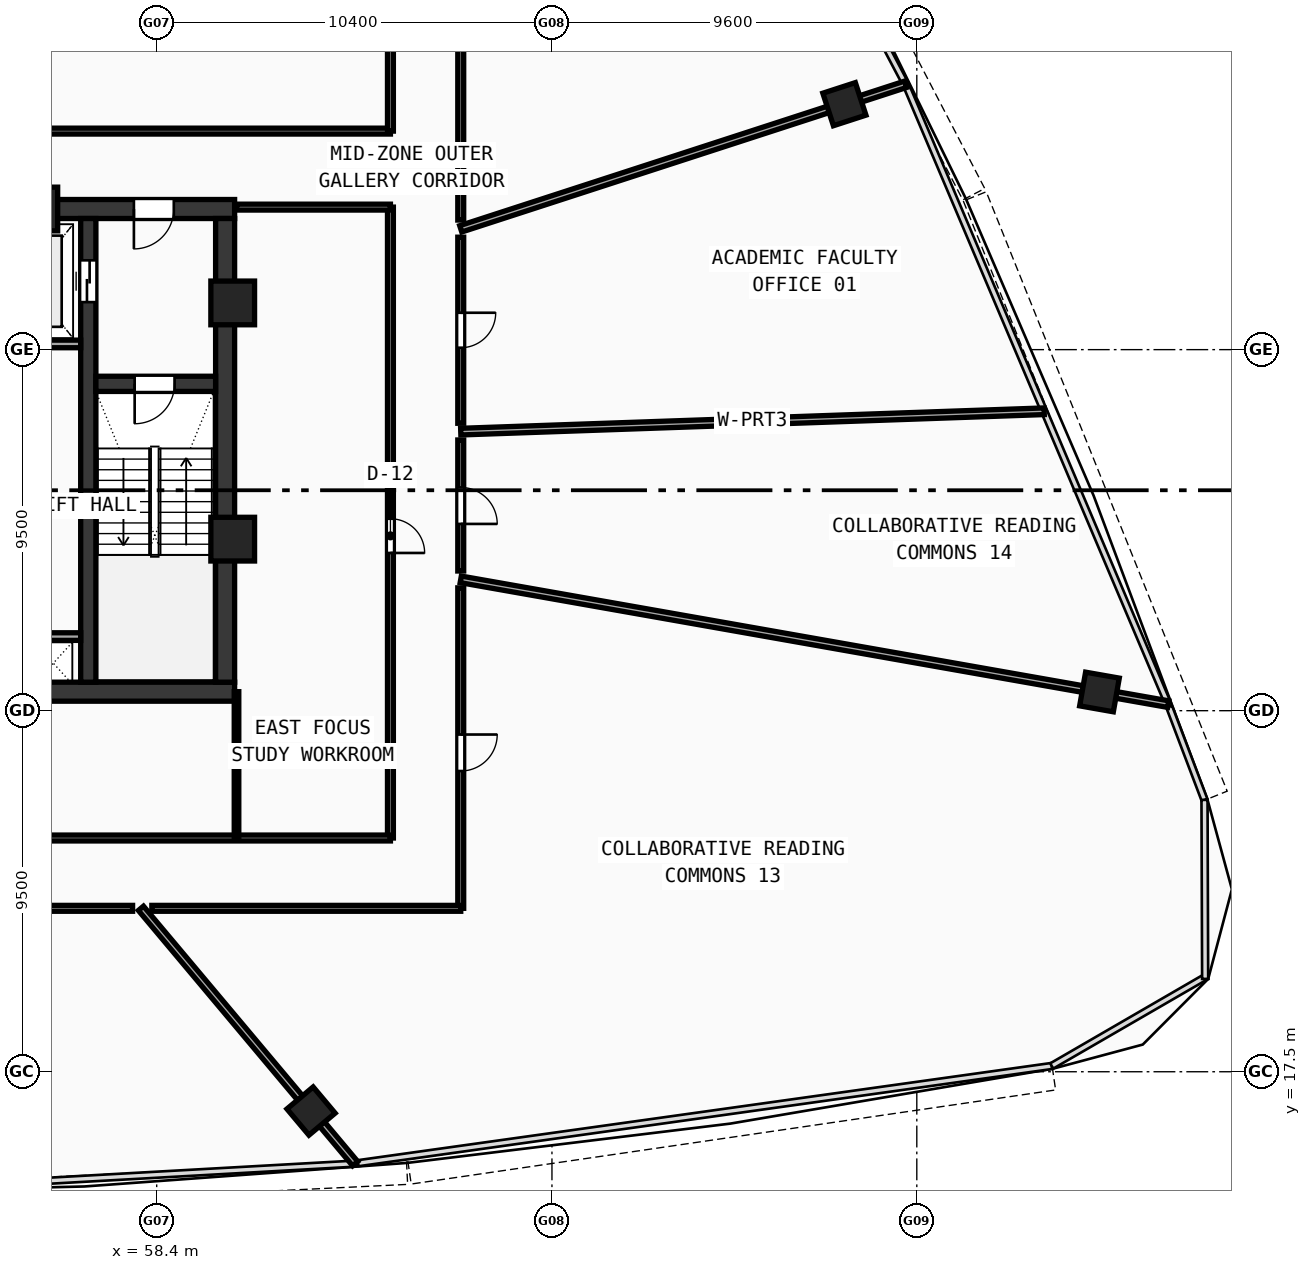
"""IFC4 building model, lengths in metres.
Left out: names, types, materials, properties, quantities, classifications, styles, units other than length and angle.
Written with IfcOpenShell. Run it as: python <this file> out.ifc"""

import sys

from ifc_helpers import new_model, si_unit, direction, frame, frame_2d, origin, origin_with_axes, origin_2d, place, context, subcontext, project, spatial, rectangle, hollow_rectangle, extrude, source, transform, mapped, element, fill, save


model = new_model("IFC4")
c1 = context("Model", 3, precision=1e-05, world=origin(), true_north=direction((0.0, 1.0)))
c2 = subcontext(c1, "Body", "Model", "MODEL_VIEW")
j1 = project(units=[si_unit("LENGTHUNIT", "METRE"), si_unit("PLANEANGLEUNIT", "RADIAN")], contexts=[c1])
p1 = place(None, origin())
s1 = spatial("IfcSite", under=j1, at=p1, CompositionType="ELEMENT")
p2 = place(p1, origin())
s2 = spatial("IfcBuilding", under=s1, at=p2, CompositionType="ELEMENT")
p3 = place(p2, frame((0.0, 0.0, 207.56)))
s3 = spatial("IfcBuildingStorey", under=s2, at=p3, CompositionType="ELEMENT", Elevation=207.56)
p4 = place(p3, frame((35.55, 27.5, 0.0), z_axis=(0.0, 0.0, 1.0), x_axis=(1.0, 0.0, 0.0)))
e1 = element("IfcWall", 1, at=p4, inside=s3, PredefinedType="SHEAR", context=c2, shape_type="SweptSolid", body=[
    extrude(rectangle(XDim=24.9, YDim=0.5, at=frame_2d((12.45, 0.0))), origin(), (0.0, 0.0, 1.0), 3.54),
])
p5 = place(p3, frame((49.2, 40.2, 0.0), z_axis=(0.0, 0.0, 1.0), x_axis=(1.0, 0.0, 0.0)))
e2 = element("IfcWall", 2, at=p5, inside=s3, PredefinedType="SHEAR", context=c2, shape_type="SweptSolid", body=[
    extrude(rectangle(XDim=11.25, YDim=0.5, at=frame_2d((5.625, 0.0))), origin(), (0.0, 0.0, 1.0), 3.54),
])
p6 = place(p5, frame((8.6, 0.0, 0.0)))
e3 = element("IfcOpeningElement", 3, at=p6, cuts=e2, PredefinedType="OPENING", context=c2, shape_type="SweptSolid", body=[
    extrude(rectangle(XDim=1.05, YDim=2.1, at=frame_2d((0.525, 1.05))), frame((0.0, 0.26, 0.0), z_axis=(0.0, -1.0, 0.0), x_axis=(1.0, 0.0, 0.0)), (0.0, 0.0, 1.0), 0.52),
])
p7 = place(p3, frame((60.2, 27.75, 0.0), z_axis=(0.0, 0.0, 1.0), x_axis=(0.0, 1.0, 0.0)))
e4 = element("IfcWall", 4, at=p7, inside=s3, PredefinedType="SHEAR", context=c2, shape_type="SweptSolid", body=[
    extrude(rectangle(XDim=12.2, YDim=0.5, at=frame_2d((6.1, 0.0))), origin(), (0.0, 0.0, 1.0), 3.54),
])
p8 = place(p3, frame((56.6, 27.75, 0.0), z_axis=(0.0, 0.0, 1.0), x_axis=(0.0, 1.0, 0.0)))
e5 = element("IfcWall", 5, at=p8, inside=s3, PredefinedType="SHEAR", context=c2, shape_type="SweptSolid", body=[
    extrude(rectangle(XDim=12.2, YDim=0.4, at=frame_2d((6.1, 0.0))), origin(), (0.0, 0.0, 1.0), 3.54),
])
p9 = place(p8, frame((10.0, 0.0, 0.0)))
e6 = element("IfcOpeningElement", 6, at=p9, cuts=e5, PredefinedType="OPENING", context=c2, shape_type="SweptSolid", body=[
    extrude(rectangle(XDim=1.1, YDim=2.1, at=frame_2d((0.55, 1.05))), frame((0.0, 0.21, 0.0), z_axis=(0.0, -1.0, 0.0), x_axis=(1.0, 0.0, 0.0)), (0.0, 0.0, 1.0), 0.42),
])
p10 = place(p3, frame((56.8, 35.6, 0.0), z_axis=(0.0, 0.0, 1.0), x_axis=(1.0, 0.0, 0.0)))
e7 = element("IfcWall", 7, at=p10, inside=s3, PredefinedType="SHEAR", context=c2, shape_type="SweptSolid", body=[
    extrude(rectangle(XDim=3.15, YDim=0.4, at=frame_2d((1.575, 0.0))), origin(), (0.0, 0.0, 1.0), 3.54),
])
p11 = place(p10, frame((1.02, 0.0, 0.0)))
e8 = element("IfcOpeningElement", 8, at=p11, cuts=e7, PredefinedType="OPENING", context=c2, shape_type="SweptSolid", body=[
    extrude(rectangle(XDim=1.05, YDim=2.1, at=frame_2d((0.525, 1.05))), frame((0.0, 0.21, 0.0), z_axis=(0.0, -1.0, 0.0), x_axis=(1.0, 0.0, 0.0)), (0.0, 0.0, 1.0), 0.42),
])
m1 = source(origin(), c2, "Body", "SweptSolid", [
    extrude(hollow_rectangle(XDim=1.15, YDim=1.15, WallThickness=0.048, at=origin_2d()), origin(), (0.0, 0.0, 1.0), 3.8),
])
for number, where, z_axis, x_axis in (
    (9, (60.4, 31.513, -0.26), (0.0, 0.0, 1.0), (1.0, 0.0, 0.0)),
    (10, (60.4, 37.729, -0.26), (0.0, 0.0, 1.0), (1.0, 0.0, 0.0)),
    (11, (55.219, 40.2, -0.26), (0.0, 0.0, 1.0), (1.0, 0.0, 0.0)),
):
    element("IfcColumn", number, at=place(p3, frame(where, z_axis=z_axis, x_axis=x_axis)), inside=s3, PredefinedType="COLUMN", context=c2, shape_type="MappedRepresentation", body=[
        mapped(m1, transform((0.0, 0.0, 0.0), scale=1.0)),
    ])
m2 = source(origin(), c2, "Body", "SweptSolid", [
    extrude(hollow_rectangle(XDim=0.9, YDim=0.9, WallThickness=0.036, at=origin_2d()), origin(), (0.0, 0.0, 1.0), 3.8),
])
for number, where, z_axis, x_axis in (
    (12, (62.461, 16.466, -0.26), (0.0, 0.0, 1.0), (0.766, 0.643, 0.0)),
    (13, (83.207, 27.492, -0.26), (0.0, 0.0, 1.0), (0.174, 0.985, 0.0)),
    (14, (76.495, 42.958, -0.26), (0.0, 0.0, 1.0), (-0.309, 0.951, 0.0)),
):
    element("IfcColumn", number, at=place(p3, frame(where, z_axis=z_axis, x_axis=x_axis)), inside=s3, PredefinedType="COLUMN", context=c2, shape_type="MappedRepresentation", body=[
        mapped(m2, transform((0.0, 0.0, 0.0), scale=1.0)),
    ])
p12 = place(p3, frame((53.68, 36.65, 0.0), z_axis=(0.0, 0.0, 1.0), x_axis=(1.0, 0.0, 0.0)))
e15 = element("IfcWall", 15, at=p12, inside=s3, PredefinedType="SOLIDWALL", context=c2, shape_type="SweptSolid", body=[
    extrude(rectangle(XDim=2.72, YDim=0.2, at=frame_2d((1.36, 0.0))), origin(), (0.0, 0.0, 1.0), 3.54),
])
p13 = place(p3, frame((55.12, 28.95, 0.0), z_axis=(0.0, 0.0, 1.0), x_axis=(1.0, 0.0, 0.0)))
e16 = element("IfcWall", 16, at=p13, inside=s3, PredefinedType="SOLIDWALL", context=c2, shape_type="SweptSolid", body=[
    extrude(rectangle(XDim=1.28, YDim=0.2, at=frame_2d((0.64, 0.0))), origin(), (0.0, 0.0, 1.0), 3.54),
])
p14 = place(p3, frame((31.45, 42.25, 0.0), z_axis=(0.0, 0.0, 1.0), x_axis=(1.0, 0.0, 0.0)))
e17 = element("IfcWall", 17, at=p14, inside=s3, PredefinedType="PARTITIONING", context=c2, shape_type="SweptSolid", body=[
    extrude(rectangle(XDim=33.1, YDim=0.155, at=frame_2d((16.55, 0.0))), origin(), (0.0, 0.0, 1.0), 2.89),
])
p15 = place(p3, frame((64.55, 42.25, 0.0), z_axis=(0.0, 0.0, 1.0), x_axis=(0.0, 1.0, 0.0)))
e18 = element("IfcWall", 18, at=p15, inside=s3, PredefinedType="PARTITIONING", context=c2, shape_type="SweptSolid", body=[
    extrude(rectangle(XDim=11.7, YDim=0.155, at=frame_2d((5.85, 0.0))), origin(), (0.0, 0.0, 1.0), 2.89),
])
p16 = place(p3, frame((64.55, 23.65, 0.0), z_axis=(0.0, 0.0, 1.0), x_axis=(0.0, 1.0, 0.0)))
e19 = element("IfcWall", 19, at=p16, inside=s3, PredefinedType="PARTITIONING", context=c2, shape_type="SweptSolid", body=[
    extrude(rectangle(XDim=16.6, YDim=0.155, at=frame_2d((8.3, 0.0))), origin(), (0.0, 0.0, 1.0), 2.89),
])
p17 = place(p16, frame((7.5, 0.0, 0.0)))
e20 = element("IfcOpeningElement", 20, at=p17, cuts=e19, PredefinedType="OPENING", context=c2, shape_type="SweptSolid", body=[
    extrude(rectangle(XDim=0.9, YDim=2.08, at=frame_2d((0.45, 1.04))), frame((0.0, 0.087, 0.0), z_axis=(0.0, -1.0, 0.0), x_axis=(1.0, 0.0, 0.0)), (0.0, 0.0, 1.0), 0.175),
])
p18 = place(p3, frame((31.45, 23.65, 0.0), z_axis=(0.0, 0.0, 1.0), x_axis=(1.0, 0.0, 0.0)))
e21 = element("IfcWall", 21, at=p18, inside=s3, PredefinedType="PARTITIONING", context=c2, shape_type="SweptSolid", body=[
    extrude(rectangle(XDim=33.1, YDim=0.155, at=frame_2d((16.55, 0.0))), origin(), (0.0, 0.0, 1.0), 2.89),
])
p19 = place(p18, frame((16.0, 0.0, 0.0)))
e22 = element("IfcOpeningElement", 22, at=p19, cuts=e21, PredefinedType="OPENING", context=c2, shape_type="SweptSolid", body=[
    extrude(rectangle(XDim=0.92, YDim=2.1, at=frame_2d((0.46, 1.05))), frame((0.0, 0.087, 0.0), z_axis=(0.0, -1.0, 0.0), x_axis=(1.0, 0.0, 0.0)), (0.0, 0.0, 1.0), 0.175),
])
p20 = place(p3, frame((60.5, 40.25, 0.0), z_axis=(0.0, 0.0, 1.0), x_axis=(1.0, 0.0, 0.0)))
e23 = element("IfcWall", 23, at=p20, inside=s3, PredefinedType="PARTITIONING", context=c2, shape_type="SweptSolid", body=[
    extrude(rectangle(XDim=4.05, YDim=0.155, at=frame_2d((2.025, 0.0))), origin(), (0.0, 0.0, 1.0), 3.54),
])
p21 = place(p3, frame((60.5, 23.65, 0.0), z_axis=(0.0, 0.0, 1.0), x_axis=(0.0, 1.0, 0.0)))
e24 = element("IfcWall", 24, at=p21, inside=s3, PredefinedType="PARTITIONING", context=c2, shape_type="SweptSolid", body=[
    extrude(rectangle(XDim=3.85, YDim=0.12, at=frame_2d((1.925, 0.0))), origin(), (0.0, 0.0, 1.0), 3.14),
])
p22 = place(p3, frame((66.4, 34.343, 0.0), z_axis=(0.0, 0.0, 1.0), x_axis=(0.999390706755, 0.034902940442, 0.0)))
e25 = element("IfcWall", 25, at=p22, inside=s3, PredefinedType="PARTITIONING", context=c2, shape_type="SweptSolid", body=[
    extrude(rectangle(XDim=15.361, YDim=0.175, at=frame_2d((7.68, 0.0))), origin(), (0.0, 0.0, 1.0), 2.89),
])
p23 = place(p3, frame((66.4, 39.678, 0.0), z_axis=(0.0, 0.0, 1.0), x_axis=(0.951057676857, 0.309013422511, 0.0)))
e26 = element("IfcWall", 26, at=p23, inside=s3, PredefinedType="PARTITIONING", context=c2, shape_type="SweptSolid", body=[
    extrude(rectangle(XDim=12.31, YDim=0.175, at=frame_2d((6.155, 0.0))), origin(), (0.0, 0.0, 1.0), 2.89),
])
p24 = place(p3, frame((57.985, 21.8, 0.0), z_axis=(0.0, 0.0, 1.0), x_axis=(0.642774108653, -0.766055771629, 0.0)))
e27 = element("IfcWall", 27, at=p24, inside=s3, PredefinedType="PARTITIONING", context=c2, shape_type="SweptSolid", body=[
    extrude(rectangle(XDim=8.769, YDim=0.175, at=frame_2d((4.385, 0.0))), origin(), (0.0, 0.0, 1.0), 2.89),
])
p25 = place(p3, frame((66.4, 30.456, 0.0), z_axis=(0.0, 0.0, 1.0), x_axis=(0.984807864876, -0.173647543254, 0.0)))
e28 = element("IfcWall", 28, at=p25, inside=s3, PredefinedType="PARTITIONING", context=c2, shape_type="SweptSolid", body=[
    extrude(rectangle(XDim=18.902, YDim=0.175, at=frame_2d((9.451, 0.0))), origin(), (0.0, 0.0, 1.0), 2.89),
])
p26 = place(p3, frame((66.4, 55.8, 0.0), z_axis=(0.0, 0.0, 1.0), x_axis=(0.0, -1.0, 0.0)))
e29 = element("IfcWall", 29, at=p26, inside=s3, PredefinedType="PARTITIONING", context=c2, shape_type="SweptSolid", body=[
    extrude(rectangle(XDim=15.89, YDim=0.155, at=frame_2d((7.945, 0.0))), origin(), (0.0, 0.0, 1.0), 2.89),
])
p27 = place(p26, frame((7.356, 0.0, 0.0)))
e30 = element("IfcOpeningElement", 30, at=p27, cuts=e29, PredefinedType="OPENING", context=c2, shape_type="SweptSolid", body=[
    extrude(rectangle(XDim=0.96, YDim=2.12, at=frame_2d((0.48, 1.06))), frame((0.0, 0.087, 0.0), z_axis=(0.0, -1.0, 0.0), x_axis=(1.0, 0.0, 0.0)), (0.0, 0.0, 1.0), 0.175),
])
p28 = place(p3, frame((66.4, 39.459, 0.0), z_axis=(0.0, 0.0, 1.0), x_axis=(0.0, -1.0, 0.0)))
e31 = element("IfcWall", 31, at=p28, inside=s3, PredefinedType="PARTITIONING", context=c2, shape_type="SweptSolid", body=[
    extrude(rectangle(XDim=4.896, YDim=0.155, at=frame_2d((2.448, 0.0))), origin(), (0.0, 0.0, 1.0), 3.14),
])
p29 = place(p28, frame((1.988, 0.0, 0.0)))
e32 = element("IfcOpeningElement", 32, at=p29, cuts=e31, PredefinedType="OPENING", context=c2, shape_type="SweptSolid", body=[
    extrude(rectangle(XDim=0.92, YDim=2.1, at=frame_2d((0.46, 1.05))), frame((0.0, 0.087, 0.0), z_axis=(0.0, -1.0, 0.0), x_axis=(1.0, 0.0, 0.0)), (0.0, 0.0, 1.0), 0.175),
])
p30 = place(p3, frame((66.4, 34.123, 0.0), z_axis=(0.0, 0.0, 1.0), x_axis=(0.0, -1.0, 0.0)))
e33 = element("IfcWall", 33, at=p30, inside=s3, PredefinedType="PARTITIONING", context=c2, shape_type="SweptSolid", body=[
    extrude(rectangle(XDim=3.448, YDim=0.155, at=frame_2d((1.724, 0.0))), origin(), (0.0, 0.0, 1.0), 3.54),
])
p31 = place(p30, frame((1.249, 0.0, 0.0)))
e34 = element("IfcOpeningElement", 34, at=p31, cuts=e33, PredefinedType="OPENING", context=c2, shape_type="SweptSolid", body=[
    extrude(rectangle(XDim=0.96, YDim=2.12, at=frame_2d((0.48, 1.06))), frame((0.0, 0.087, 0.0), z_axis=(0.0, -1.0, 0.0), x_axis=(1.0, 0.0, 0.0)), (0.0, 0.0, 1.0), 0.175),
])
p32 = place(p3, frame((66.4, 30.232, 0.0), z_axis=(0.0, 0.0, 1.0), x_axis=(0.0, -1.0, 0.0)))
e35 = element("IfcWall", 35, at=p32, inside=s3, PredefinedType="PARTITIONING", context=c2, shape_type="SweptSolid", body=[
    extrude(rectangle(XDim=8.432, YDim=0.155, at=frame_2d((4.216, 0.0))), origin(), (0.0, 0.0, 1.0), 3.14),
])
p33 = place(p32, frame((3.859, 0.0, 0.0)))
e36 = element("IfcOpeningElement", 36, at=p33, cuts=e35, PredefinedType="OPENING", context=c2, shape_type="SweptSolid", body=[
    extrude(rectangle(XDim=0.96, YDim=2.12, at=frame_2d((0.48, 1.06))), frame((0.0, 0.087, 0.0), z_axis=(0.0, -1.0, 0.0), x_axis=(1.0, 0.0, 0.0)), (0.0, 0.0, 1.0), 0.175),
])
p34 = place(p3, frame((66.4, 21.8, 0.0), z_axis=(0.0, 0.0, 1.0), x_axis=(-1.0, 0.0, 0.0)))
e37 = element("IfcWall", 37, at=p34, inside=s3, PredefinedType="PARTITIONING", context=c2, shape_type="SweptSolid", body=[
    extrude(rectangle(XDim=8.127, YDim=0.155, at=frame_2d((4.064, 0.0))), origin(), (0.0, 0.0, 1.0), 3.14),
])
p35 = place(p3, frame((57.765, 21.8, 0.0), z_axis=(0.0, 0.0, 1.0), x_axis=(-1.0, 0.0, 0.0)))
e38 = element("IfcWall", 38, at=p35, inside=s3, PredefinedType="PARTITIONING", context=c2, shape_type="SweptSolid", body=[
    extrude(rectangle(XDim=12.734, YDim=0.155, at=frame_2d((6.367, 0.0))), origin(), (0.0, 0.0, 1.0), 2.89),
])
p36 = place(p35, frame((5.892, 0.0, 0.0)))
e39 = element("IfcOpeningElement", 39, at=p36, cuts=e38, PredefinedType="OPENING", context=c2, shape_type="SweptSolid", body=[
    extrude(rectangle(XDim=0.96, YDim=2.12, at=frame_2d((0.48, 1.06))), frame((0.0, 0.087, 0.0), z_axis=(0.0, -1.0, 0.0), x_axis=(1.0, 0.0, 0.0)), (0.0, 0.0, 1.0), 0.175),
])
m3 = source(origin(), c2, "Body", "SweptSolid", [
    extrude(rectangle(XDim=1.05, YDim=2.1, at=frame_2d((0.525, 1.05))), frame((0.0, 0.025, 0.0), z_axis=(0.0, -1.0, 0.0), x_axis=(1.0, 0.0, 0.0)), (0.0, 0.0, 1.0), 0.05),
])
p37 = place(p11, frame((1.05, 0.0, 0.0), z_axis=(0.0, 0.0, 1.0), x_axis=(-1.0, 0.0, 0.0)))
e40 = element("IfcDoor", 40, at=p37, inside=s3, OperationType="SINGLE_SWING_RIGHT", PredefinedType="DOOR", context=c2, shape_type="MappedRepresentation", body=[
    mapped(m3, transform((0.0, 0.0, 0.0), scale=1.0)),
])
fill(e8, e40)
p38 = place(p6, frame((1.05, 0.0, 0.0), z_axis=(0.0, 0.0, 1.0), x_axis=(-1.0, 0.0, 0.0)))
e41 = element("IfcDoor", 41, at=p38, inside=s3, OperationType="SINGLE_SWING_RIGHT", PredefinedType="DOOR", context=c2, shape_type="MappedRepresentation", body=[
    mapped(m3, transform((0.0, 0.0, 0.0), scale=1.0)),
])
fill(e3, e41)
m4 = source(origin(), c2, "Body", "SweptSolid", [
    extrude(rectangle(XDim=1.1, YDim=2.1, at=frame_2d((0.55, 1.05))), frame((0.0, 0.025, 0.0), z_axis=(0.0, -1.0, 0.0), x_axis=(1.0, 0.0, 0.0)), (0.0, 0.0, 1.0), 0.05),
])
p39 = place(p9, origin_with_axes())
e42 = element("IfcDoor", 42, at=p39, inside=s3, OperationType="DOUBLE_DOOR_SLIDING", PredefinedType="DOOR", context=c2, shape_type="MappedRepresentation", body=[
    mapped(m4, transform((0.0, 0.0, 0.0), scale=1.0)),
])
fill(e6, e42)
m5 = source(origin(), c2, "Body", "SweptSolid", [
    extrude(rectangle(XDim=0.9, YDim=2.08, at=frame_2d((0.45, 1.04))), frame((0.0, 0.025, 0.0), z_axis=(0.0, -1.0, 0.0), x_axis=(1.0, 0.0, 0.0)), (0.0, 0.0, 1.0), 0.05),
])
p40 = place(p17, frame((0.9, 0.0, 0.0), z_axis=(0.0, 0.0, 1.0), x_axis=(-1.0, 0.0, 0.0)))
e43 = element("IfcDoor", 43, at=p40, inside=s3, OperationType="SINGLE_SWING_RIGHT", PredefinedType="DOOR", context=c2, shape_type="MappedRepresentation", body=[
    mapped(m5, transform((0.0, 0.0, 0.0), scale=1.0)),
])
fill(e20, e43)
m6 = source(origin(), c2, "Body", "SweptSolid", [
    extrude(rectangle(XDim=0.92, YDim=2.1, at=frame_2d((0.46, 1.05))), frame((0.0, 0.025, 0.0), z_axis=(0.0, -1.0, 0.0), x_axis=(1.0, 0.0, 0.0)), (0.0, 0.0, 1.0), 0.05),
])
p41 = place(p29, origin_with_axes())
e44 = element("IfcDoor", 44, at=p41, inside=s3, OperationType="SINGLE_SWING_LEFT", PredefinedType="DOOR", context=c2, shape_type="MappedRepresentation", body=[
    mapped(m6, transform((0.0, 0.0, 0.0), scale=1.0)),
])
fill(e32, e44)
m7 = source(origin(), c2, "Body", "SweptSolid", [
    extrude(rectangle(XDim=0.96, YDim=2.12, at=frame_2d((0.48, 1.06))), frame((0.0, 0.025, 0.0), z_axis=(0.0, -1.0, 0.0), x_axis=(1.0, 0.0, 0.0)), (0.0, 0.0, 1.0), 0.05),
])
p42 = place(p33, origin_with_axes())
e45 = element("IfcDoor", 45, at=p42, inside=s3, OperationType="SINGLE_SWING_LEFT", PredefinedType="DOOR", context=c2, shape_type="MappedRepresentation", body=[
    mapped(m7, transform((0.0, 0.0, 0.0), scale=1.0)),
])
fill(e36, e45)
p43 = place(p31, origin_with_axes())
e46 = element("IfcDoor", 46, at=p43, inside=s3, OperationType="SINGLE_SWING_RIGHT", PredefinedType="DOOR", context=c2, shape_type="MappedRepresentation", body=[
    mapped(m7, transform((0.0, 0.0, 0.0), scale=1.0)),
])
fill(e34, e46)
save(model, sys.argv[1])
